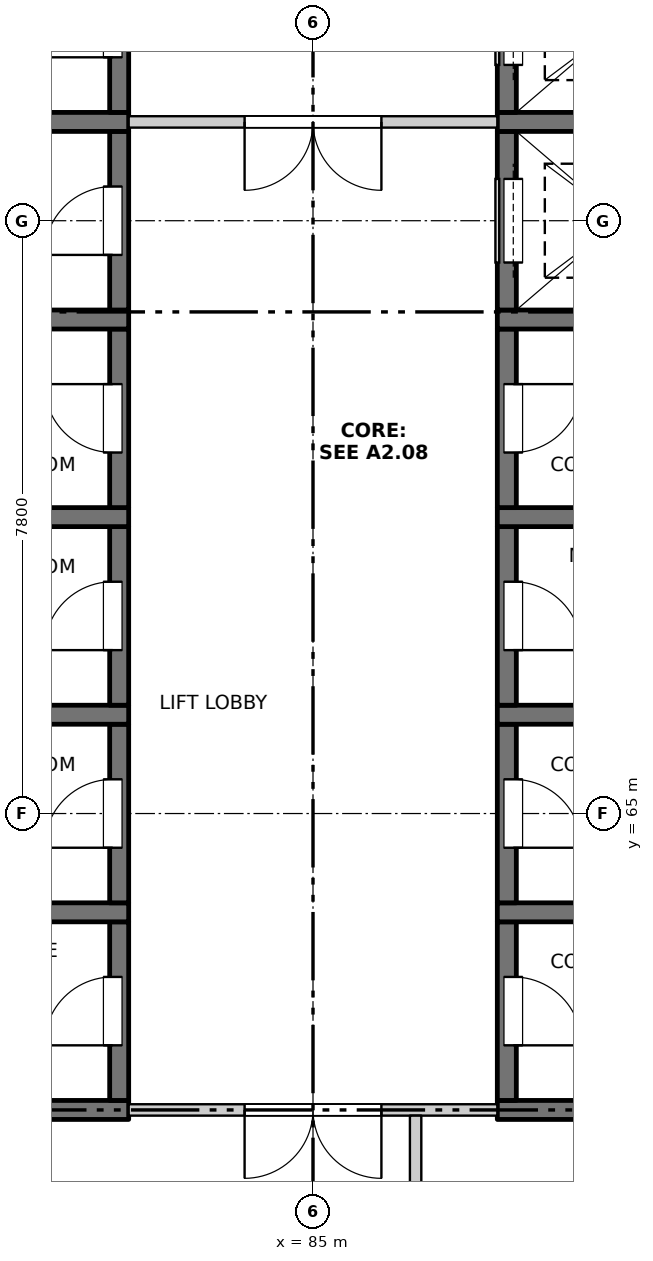
"""IFC4 building model, lengths in metres.
Left out: names, types, materials, properties, quantities, classifications, styles, units other than length and angle.
Written with IfcOpenShell. Run it as: python <this file> out.ifc"""

import sys

from ifc_helpers import new_model, si_unit, direction, frame, frame_2d, origin, place, context, subcontext, project, spatial, rectangle, extrude, element, fill, save


model = new_model("IFC4")
c1 = context("Model", 3, precision=1e-05, world=origin(), true_north=direction((0.0, 1.0)))
c2 = subcontext(c1, "Body", "Model", "MODEL_VIEW")
j1 = project(units=[si_unit("LENGTHUNIT", "METRE"), si_unit("PLANEANGLEUNIT", "RADIAN")], contexts=[c1])
p1 = place(None, origin())
s1 = spatial("IfcSite", under=j1, at=p1, CompositionType="ELEMENT")
p2 = place(p1, origin())
s2 = spatial("IfcBuilding", under=s1, at=p2, CompositionType="ELEMENT")
p3 = place(p2, frame((0.0, 0.0, 249.4)))
s3 = spatial("IfcBuildingStorey", under=s2, at=p3, CompositionType="ELEMENT", Elevation=249.4)
p4 = place(p3, frame((79.575, 61.1, -0.25), z_axis=(0.0, 0.0, 1.0), x_axis=(1.0, 0.0, 0.0)))
e1 = element("IfcWall", 1, at=p4, inside=s3, PredefinedType="SOLIDWALL", context=c2, shape_type="SweptSolid", body=[
    extrude(rectangle(XDim=3.0, YDim=0.25, at=frame_2d((1.5, 0.0))), origin(), (0.0, 0.0, 1.0), 3.4),
])
p5 = place(p3, frame((82.45, 61.225, -0.25), z_axis=(0.0, 0.0, 1.0), x_axis=(0.0, 1.0, 0.0)))
e2 = element("IfcWall", 2, at=p5, inside=s3, PredefinedType="SOLIDWALL", context=c2, shape_type="SweptSolid", body=[
    extrude(rectangle(XDim=2.35, YDim=0.25, at=frame_2d((1.175, 0.0))), origin(), (0.0, 0.0, 1.0), 3.4),
])
p6 = place(p5, frame((0.725, 0.0, 0.25)))
e3 = element("IfcOpeningElement", 3, at=p6, cuts=e2, PredefinedType="OPENING", context=c2, shape_type="SweptSolid", body=[
    extrude(rectangle(XDim=0.9, YDim=2.1, at=frame_2d((0.45, 1.05))), frame((0.0, 0.135, 0.0), z_axis=(0.0, -1.0, 0.0), x_axis=(1.0, 0.0, 0.0)), (0.0, 0.0, 1.0), 0.27),
])
p7 = place(p3, frame((79.575, 63.7, -0.25), z_axis=(0.0, 0.0, 1.0), x_axis=(1.0, 0.0, 0.0)))
e4 = element("IfcWall", 4, at=p7, inside=s3, PredefinedType="SOLIDWALL", context=c2, shape_type="SweptSolid", body=[
    extrude(rectangle(XDim=3.0, YDim=0.25, at=frame_2d((1.5, 0.0))), origin(), (0.0, 0.0, 1.0), 3.4),
])
p8 = place(p3, frame((82.45, 63.825, -0.25), z_axis=(0.0, 0.0, 1.0), x_axis=(0.0, 1.0, 0.0)))
e5 = element("IfcWall", 5, at=p8, inside=s3, PredefinedType="SOLIDWALL", context=c2, shape_type="SweptSolid", body=[
    extrude(rectangle(XDim=2.35, YDim=0.25, at=frame_2d((1.175, 0.0))), origin(), (0.0, 0.0, 1.0), 3.4),
])
p9 = place(p8, frame((0.725, 0.0, 0.25)))
e6 = element("IfcOpeningElement", 6, at=p9, cuts=e5, PredefinedType="OPENING", context=c2, shape_type="SweptSolid", body=[
    extrude(rectangle(XDim=0.9, YDim=2.1, at=frame_2d((0.45, 1.05))), frame((0.0, 0.135, 0.0), z_axis=(0.0, -1.0, 0.0), x_axis=(1.0, 0.0, 0.0)), (0.0, 0.0, 1.0), 0.27),
])
p10 = place(p3, frame((79.575, 66.3, -0.25), z_axis=(0.0, 0.0, 1.0), x_axis=(1.0, 0.0, 0.0)))
e7 = element("IfcWall", 7, at=p10, inside=s3, PredefinedType="SOLIDWALL", context=c2, shape_type="SweptSolid", body=[
    extrude(rectangle(XDim=3.0, YDim=0.25, at=frame_2d((1.5, 0.0))), origin(), (0.0, 0.0, 1.0), 3.4),
])
p11 = place(p3, frame((82.45, 66.425, -0.25), z_axis=(0.0, 0.0, 1.0), x_axis=(0.0, 1.0, 0.0)))
e8 = element("IfcWall", 8, at=p11, inside=s3, PredefinedType="SOLIDWALL", context=c2, shape_type="SweptSolid", body=[
    extrude(rectangle(XDim=2.35, YDim=0.25, at=frame_2d((1.175, 0.0))), origin(), (0.0, 0.0, 1.0), 3.4),
])
p12 = place(p11, frame((0.725, 0.0, 0.25)))
e9 = element("IfcOpeningElement", 9, at=p12, cuts=e8, PredefinedType="OPENING", context=c2, shape_type="SweptSolid", body=[
    extrude(rectangle(XDim=0.9, YDim=2.1, at=frame_2d((0.45, 1.05))), frame((0.0, 0.135, 0.0), z_axis=(0.0, -1.0, 0.0), x_axis=(1.0, 0.0, 0.0)), (0.0, 0.0, 1.0), 0.27),
])
p13 = place(p3, frame((79.575, 68.9, -0.25), z_axis=(0.0, 0.0, 1.0), x_axis=(1.0, 0.0, 0.0)))
e10 = element("IfcWall", 10, at=p13, inside=s3, PredefinedType="SOLIDWALL", context=c2, shape_type="SweptSolid", body=[
    extrude(rectangle(XDim=3.0, YDim=0.25, at=frame_2d((1.5, 0.0))), origin(), (0.0, 0.0, 1.0), 3.4),
])
p14 = place(p3, frame((82.45, 69.025, -0.25), z_axis=(0.0, 0.0, 1.0), x_axis=(0.0, 1.0, 0.0)))
e11 = element("IfcWall", 11, at=p14, inside=s3, PredefinedType="SOLIDWALL", context=c2, shape_type="SweptSolid", body=[
    extrude(rectangle(XDim=2.35, YDim=0.25, at=frame_2d((1.175, 0.0))), origin(), (0.0, 0.0, 1.0), 3.4),
])
p15 = place(p14, frame((0.725, 0.0, 0.25)))
e12 = element("IfcOpeningElement", 12, at=p15, cuts=e11, PredefinedType="OPENING", context=c2, shape_type="SweptSolid", body=[
    extrude(rectangle(XDim=0.9, YDim=2.1, at=frame_2d((0.45, 1.05))), frame((0.0, 0.135, 0.0), z_axis=(0.0, -1.0, 0.0), x_axis=(1.0, 0.0, 0.0)), (0.0, 0.0, 1.0), 0.27),
])
p16 = place(p3, frame((79.575, 71.5, -0.25), z_axis=(0.0, 0.0, 1.0), x_axis=(1.0, 0.0, 0.0)))
e13 = element("IfcWall", 13, at=p16, inside=s3, PredefinedType="SOLIDWALL", context=c2, shape_type="SweptSolid", body=[
    extrude(rectangle(XDim=3.0, YDim=0.25, at=frame_2d((1.5, 0.0))), origin(), (0.0, 0.0, 1.0), 3.4),
])
p17 = place(p3, frame((82.45, 71.625, -0.25), z_axis=(0.0, 0.0, 1.0), x_axis=(0.0, 1.0, 0.0)))
e14 = element("IfcWall", 14, at=p17, inside=s3, PredefinedType="SOLIDWALL", context=c2, shape_type="SweptSolid", body=[
    extrude(rectangle(XDim=2.35, YDim=0.25, at=frame_2d((1.175, 0.0))), origin(), (0.0, 0.0, 1.0), 3.4),
])
p18 = place(p17, frame((0.725, 0.0, 0.25)))
e15 = element("IfcOpeningElement", 15, at=p18, cuts=e14, PredefinedType="OPENING", context=c2, shape_type="SweptSolid", body=[
    extrude(rectangle(XDim=0.9, YDim=2.1, at=frame_2d((0.45, 1.05))), frame((0.0, 0.135, 0.0), z_axis=(0.0, -1.0, 0.0), x_axis=(1.0, 0.0, 0.0)), (0.0, 0.0, 1.0), 0.27),
])
p19 = place(p3, frame((79.575, 74.1, -0.25), z_axis=(0.0, 0.0, 1.0), x_axis=(1.0, 0.0, 0.0)))
e16 = element("IfcWall", 16, at=p19, inside=s3, PredefinedType="SOLIDWALL", context=c2, shape_type="SweptSolid", body=[
    extrude(rectangle(XDim=3.0, YDim=0.25, at=frame_2d((1.5, 0.0))), origin(), (0.0, 0.0, 1.0), 3.4),
])
p20 = place(p3, frame((82.45, 74.225, -0.25), z_axis=(0.0, 0.0, 1.0), x_axis=(0.0, 1.0, 0.0)))
e17 = element("IfcWall", 17, at=p20, inside=s3, PredefinedType="SOLIDWALL", context=c2, shape_type="SweptSolid", body=[
    extrude(rectangle(XDim=2.35, YDim=0.25, at=frame_2d((1.175, 0.0))), origin(), (0.0, 0.0, 1.0), 3.4),
])
p21 = place(p20, frame((0.725, 0.0, 0.25)))
e18 = element("IfcOpeningElement", 18, at=p21, cuts=e17, PredefinedType="OPENING", context=c2, shape_type="SweptSolid", body=[
    extrude(rectangle(XDim=0.9, YDim=2.1, at=frame_2d((0.45, 1.05))), frame((0.0, 0.135, 0.0), z_axis=(0.0, -1.0, 0.0), x_axis=(1.0, 0.0, 0.0)), (0.0, 0.0, 1.0), 0.27),
])
p22 = place(p3, frame((87.425, 61.1, -0.25), z_axis=(0.0, 0.0, 1.0), x_axis=(1.0, 0.0, 0.0)))
e19 = element("IfcWall", 19, at=p22, inside=s3, PredefinedType="SOLIDWALL", context=c2, shape_type="SweptSolid", body=[
    extrude(rectangle(XDim=3.0, YDim=0.25, at=frame_2d((1.5, 0.0))), origin(), (0.0, 0.0, 1.0), 3.4),
])
p23 = place(p3, frame((87.55, 61.225, -0.25), z_axis=(0.0, 0.0, 1.0), x_axis=(0.0, 1.0, 0.0)))
e20 = element("IfcWall", 20, at=p23, inside=s3, PredefinedType="SOLIDWALL", context=c2, shape_type="SweptSolid", body=[
    extrude(rectangle(XDim=2.35, YDim=0.25, at=frame_2d((1.175, 0.0))), origin(), (0.0, 0.0, 1.0), 3.4),
])
p24 = place(p23, frame((0.725, 0.0, 0.25)))
e21 = element("IfcOpeningElement", 21, at=p24, cuts=e20, PredefinedType="OPENING", context=c2, shape_type="SweptSolid", body=[
    extrude(rectangle(XDim=0.9, YDim=2.1, at=frame_2d((0.45, 1.05))), frame((0.0, 0.135, 0.0), z_axis=(0.0, -1.0, 0.0), x_axis=(1.0, 0.0, 0.0)), (0.0, 0.0, 1.0), 0.27),
])
p25 = place(p3, frame((87.425, 63.7, -0.25), z_axis=(0.0, 0.0, 1.0), x_axis=(1.0, 0.0, 0.0)))
e22 = element("IfcWall", 22, at=p25, inside=s3, PredefinedType="SOLIDWALL", context=c2, shape_type="SweptSolid", body=[
    extrude(rectangle(XDim=3.0, YDim=0.25, at=frame_2d((1.5, 0.0))), origin(), (0.0, 0.0, 1.0), 3.4),
])
p26 = place(p3, frame((87.55, 63.825, -0.25), z_axis=(0.0, 0.0, 1.0), x_axis=(0.0, 1.0, 0.0)))
e23 = element("IfcWall", 23, at=p26, inside=s3, PredefinedType="SOLIDWALL", context=c2, shape_type="SweptSolid", body=[
    extrude(rectangle(XDim=2.35, YDim=0.25, at=frame_2d((1.175, 0.0))), origin(), (0.0, 0.0, 1.0), 3.4),
])
p27 = place(p26, frame((0.725, 0.0, 0.25)))
e24 = element("IfcOpeningElement", 24, at=p27, cuts=e23, PredefinedType="OPENING", context=c2, shape_type="SweptSolid", body=[
    extrude(rectangle(XDim=0.9, YDim=2.1, at=frame_2d((0.45, 1.05))), frame((0.0, 0.135, 0.0), z_axis=(0.0, -1.0, 0.0), x_axis=(1.0, 0.0, 0.0)), (0.0, 0.0, 1.0), 0.27),
])
p28 = place(p3, frame((87.425, 66.3, -0.25), z_axis=(0.0, 0.0, 1.0), x_axis=(1.0, 0.0, 0.0)))
e25 = element("IfcWall", 25, at=p28, inside=s3, PredefinedType="SOLIDWALL", context=c2, shape_type="SweptSolid", body=[
    extrude(rectangle(XDim=3.0, YDim=0.25, at=frame_2d((1.5, 0.0))), origin(), (0.0, 0.0, 1.0), 3.4),
])
p29 = place(p3, frame((87.55, 66.425, -0.25), z_axis=(0.0, 0.0, 1.0), x_axis=(0.0, 1.0, 0.0)))
e26 = element("IfcWall", 26, at=p29, inside=s3, PredefinedType="SOLIDWALL", context=c2, shape_type="SweptSolid", body=[
    extrude(rectangle(XDim=2.35, YDim=0.25, at=frame_2d((1.175, 0.0))), origin(), (0.0, 0.0, 1.0), 3.4),
])
p30 = place(p29, frame((0.725, 0.0, 0.25)))
e27 = element("IfcOpeningElement", 27, at=p30, cuts=e26, PredefinedType="OPENING", context=c2, shape_type="SweptSolid", body=[
    extrude(rectangle(XDim=0.9, YDim=2.1, at=frame_2d((0.45, 1.05))), frame((0.0, 0.135, 0.0), z_axis=(0.0, -1.0, 0.0), x_axis=(1.0, 0.0, 0.0)), (0.0, 0.0, 1.0), 0.27),
])
p31 = place(p3, frame((87.425, 68.9, -0.25), z_axis=(0.0, 0.0, 1.0), x_axis=(1.0, 0.0, 0.0)))
e28 = element("IfcWall", 28, at=p31, inside=s3, PredefinedType="SOLIDWALL", context=c2, shape_type="SweptSolid", body=[
    extrude(rectangle(XDim=3.0, YDim=0.25, at=frame_2d((1.5, 0.0))), origin(), (0.0, 0.0, 1.0), 3.4),
])
p32 = place(p3, frame((87.55, 69.025, -0.25), z_axis=(0.0, 0.0, 1.0), x_axis=(0.0, 1.0, 0.0)))
e29 = element("IfcWall", 29, at=p32, inside=s3, PredefinedType="SOLIDWALL", context=c2, shape_type="SweptSolid", body=[
    extrude(rectangle(XDim=2.35, YDim=0.25, at=frame_2d((1.175, 0.0))), origin(), (0.0, 0.0, 1.0), 3.4),
])
p33 = place(p32, frame((0.725, 0.0, 0.25)))
e30 = element("IfcOpeningElement", 30, at=p33, cuts=e29, PredefinedType="OPENING", context=c2, shape_type="SweptSolid", body=[
    extrude(rectangle(XDim=0.9, YDim=2.1, at=frame_2d((0.45, 1.05))), frame((0.0, 0.135, 0.0), z_axis=(0.0, -1.0, 0.0), x_axis=(1.0, 0.0, 0.0)), (0.0, 0.0, 1.0), 0.27),
])
p34 = place(p3, frame((87.425, 71.5, -0.25), z_axis=(0.0, 0.0, 1.0), x_axis=(1.0, 0.0, 0.0)))
e31 = element("IfcWall", 31, at=p34, inside=s3, PredefinedType="SOLIDWALL", context=c2, shape_type="SweptSolid", body=[
    extrude(rectangle(XDim=3.0, YDim=0.25, at=frame_2d((1.5, 0.0))), origin(), (0.0, 0.0, 1.0), 3.4),
])
p35 = place(p3, frame((87.55, 71.625, -0.25), z_axis=(0.0, 0.0, 1.0), x_axis=(0.0, 1.0, 0.0)))
e32 = element("IfcWall", 32, at=p35, inside=s3, PredefinedType="SOLIDWALL", context=c2, shape_type="SweptSolid", body=[
    extrude(rectangle(XDim=2.35, YDim=0.25, at=frame_2d((1.175, 0.0))), origin(), (0.0, 0.0, 1.0), 3.4),
])
p36 = place(p35, frame((0.625, 0.0, 0.25)))
e33 = element("IfcOpeningElement", 33, at=p36, cuts=e32, PredefinedType="OPENING", context=c2, shape_type="SweptSolid", body=[
    extrude(rectangle(XDim=1.1, YDim=2.1, at=frame_2d((0.55, 1.05))), frame((0.0, 0.135, 0.0), z_axis=(0.0, -1.0, 0.0), x_axis=(1.0, 0.0, 0.0)), (0.0, 0.0, 1.0), 0.27),
])
p37 = place(p3, frame((87.425, 74.1, -0.25), z_axis=(0.0, 0.0, 1.0), x_axis=(1.0, 0.0, 0.0)))
e34 = element("IfcWall", 34, at=p37, inside=s3, PredefinedType="SOLIDWALL", context=c2, shape_type="SweptSolid", body=[
    extrude(rectangle(XDim=3.0, YDim=0.25, at=frame_2d((1.5, 0.0))), origin(), (0.0, 0.0, 1.0), 3.4),
])
p38 = place(p3, frame((87.55, 74.225, -0.25), z_axis=(0.0, 0.0, 1.0), x_axis=(0.0, 1.0, 0.0)))
e35 = element("IfcWall", 35, at=p38, inside=s3, PredefinedType="SOLIDWALL", context=c2, shape_type="SweptSolid", body=[
    extrude(rectangle(XDim=2.35, YDim=0.25, at=frame_2d((1.175, 0.0))), origin(), (0.0, 0.0, 1.0), 3.4),
])
p39 = place(p38, frame((0.625, 0.0, 0.25)))
e36 = element("IfcOpeningElement", 36, at=p39, cuts=e35, PredefinedType="OPENING", context=c2, shape_type="SweptSolid", body=[
    extrude(rectangle(XDim=1.1, YDim=2.1, at=frame_2d((0.55, 1.05))), frame((0.0, 0.135, 0.0), z_axis=(0.0, -1.0, 0.0), x_axis=(1.0, 0.0, 0.0)), (0.0, 0.0, 1.0), 0.27),
])
p40 = place(p3, frame((82.575, 61.1, 0.0), z_axis=(0.0, 0.0, 1.0), x_axis=(1.0, 0.0, 0.0)))
e37 = element("IfcWall", 37, at=p40, inside=s3, PredefinedType="PARTITIONING", context=c2, shape_type="SweptSolid", body=[
    extrude(rectangle(XDim=4.85, YDim=0.15, at=frame_2d((2.425, 0.0))), origin(), (0.0, 0.0, 1.0), 3.15),
])
p41 = place(p40, frame((1.525, 0.0, 0.0)))
e38 = element("IfcOpeningElement", 38, at=p41, cuts=e37, PredefinedType="OPENING", context=c2, shape_type="SweptSolid", body=[
    extrude(rectangle(XDim=1.8, YDim=2.1, at=frame_2d((0.9, 1.05))), frame((0.0, 0.085, 0.0), z_axis=(0.0, -1.0, 0.0), x_axis=(1.0, 0.0, 0.0)), (0.0, 0.0, 1.0), 0.17),
])
p42 = place(p3, frame((82.575, 74.1, 0.0), z_axis=(0.0, 0.0, 1.0), x_axis=(1.0, 0.0, 0.0)))
e39 = element("IfcWall", 39, at=p42, inside=s3, PredefinedType="PARTITIONING", context=c2, shape_type="SweptSolid", body=[
    extrude(rectangle(XDim=4.85, YDim=0.15, at=frame_2d((2.425, 0.0))), origin(), (0.0, 0.0, 1.0), 3.15),
])
p43 = place(p42, frame((1.525, 0.0, 0.0)))
e40 = element("IfcOpeningElement", 40, at=p43, cuts=e39, PredefinedType="OPENING", context=c2, shape_type="SweptSolid", body=[
    extrude(rectangle(XDim=1.8, YDim=2.1, at=frame_2d((0.9, 1.05))), frame((0.0, 0.085, 0.0), z_axis=(0.0, -1.0, 0.0), x_axis=(1.0, 0.0, 0.0)), (0.0, 0.0, 1.0), 0.17),
])
p44 = place(p3, frame((86.35, 55.45, 0.0), z_axis=(0.0, 0.0, 1.0), x_axis=(0.0, 1.0, 0.0)))
e41 = element("IfcWall", 41, at=p44, inside=s3, PredefinedType="PARTITIONING", context=c2, shape_type="SweptSolid", body=[
    extrude(rectangle(XDim=5.575, YDim=0.15, at=frame_2d((2.788, 0.0))), origin(), (0.0, 0.0, 1.0), 3.15),
])
p45 = place(p44, frame((2.25, 0.0, 0.0)))
e42 = element("IfcOpeningElement", 42, at=p45, cuts=e41, PredefinedType="OPENING", context=c2, shape_type="SweptSolid", body=[
    extrude(rectangle(XDim=0.9, YDim=2.1, at=frame_2d((0.45, 1.05))), frame((0.0, 0.085, 0.0), z_axis=(0.0, -1.0, 0.0), x_axis=(1.0, 0.0, 0.0)), (0.0, 0.0, 1.0), 0.17),
])
p46 = place(p41, origin())
e43 = element("IfcDoor", 43, at=p46, inside=s3, OperationType="DOUBLE_DOOR_SINGLE_SWING", PredefinedType="DOOR", context=c2, shape_type="SweptSolid", body=[
    extrude(rectangle(XDim=1.8, YDim=2.1, at=frame_2d((0.9, 1.05))), frame((0.0, 0.025, 0.0), z_axis=(0.0, -1.0, 0.0), x_axis=(1.0, 0.0, 0.0)), (0.0, 0.0, 1.0), 0.05),
])
fill(e38, e43)
p47 = place(p6, origin())
e44 = element("IfcDoor", 44, at=p47, inside=s3, OperationType="SINGLE_SWING_LEFT", PredefinedType="DOOR", context=c2, shape_type="SweptSolid", body=[
    extrude(rectangle(XDim=0.9, YDim=2.1, at=frame_2d((0.45, 1.05))), frame((0.0, 0.11, 0.0), z_axis=(0.0, -1.0, 0.0), x_axis=(1.0, 0.0, 0.0)), (0.0, 0.0, 1.0), 0.05),
])
fill(e3, e44)
p48 = place(p24, origin())
e45 = element("IfcDoor", 45, at=p48, inside=s3, OperationType="SINGLE_SWING_RIGHT", PredefinedType="DOOR", context=c2, shape_type="SweptSolid", body=[
    extrude(rectangle(XDim=0.9, YDim=2.1, at=frame_2d((0.45, 1.05))), frame((0.0, -0.06, 0.0), z_axis=(0.0, -1.0, 0.0), x_axis=(1.0, 0.0, 0.0)), (0.0, 0.0, 1.0), 0.05),
])
fill(e21, e45)
p49 = place(p9, origin())
e46 = element("IfcDoor", 46, at=p49, inside=s3, OperationType="SINGLE_SWING_LEFT", PredefinedType="DOOR", context=c2, shape_type="SweptSolid", body=[
    extrude(rectangle(XDim=0.9, YDim=2.1, at=frame_2d((0.45, 1.05))), frame((0.0, 0.11, 0.0), z_axis=(0.0, -1.0, 0.0), x_axis=(1.0, 0.0, 0.0)), (0.0, 0.0, 1.0), 0.05),
])
fill(e6, e46)
p50 = place(p27, origin())
e47 = element("IfcDoor", 47, at=p50, inside=s3, OperationType="SINGLE_SWING_RIGHT", PredefinedType="DOOR", context=c2, shape_type="SweptSolid", body=[
    extrude(rectangle(XDim=0.9, YDim=2.1, at=frame_2d((0.45, 1.05))), frame((0.0, -0.06, 0.0), z_axis=(0.0, -1.0, 0.0), x_axis=(1.0, 0.0, 0.0)), (0.0, 0.0, 1.0), 0.05),
])
fill(e24, e47)
p51 = place(p12, origin())
e48 = element("IfcDoor", 48, at=p51, inside=s3, OperationType="SINGLE_SWING_LEFT", PredefinedType="DOOR", context=c2, shape_type="SweptSolid", body=[
    extrude(rectangle(XDim=0.9, YDim=2.1, at=frame_2d((0.45, 1.05))), frame((0.0, 0.11, 0.0), z_axis=(0.0, -1.0, 0.0), x_axis=(1.0, 0.0, 0.0)), (0.0, 0.0, 1.0), 0.05),
])
fill(e9, e48)
p52 = place(p30, origin())
e49 = element("IfcDoor", 49, at=p52, inside=s3, OperationType="SINGLE_SWING_RIGHT", PredefinedType="DOOR", context=c2, shape_type="SweptSolid", body=[
    extrude(rectangle(XDim=0.9, YDim=2.1, at=frame_2d((0.45, 1.05))), frame((0.0, -0.06, 0.0), z_axis=(0.0, -1.0, 0.0), x_axis=(1.0, 0.0, 0.0)), (0.0, 0.0, 1.0), 0.05),
])
fill(e27, e49)
p53 = place(p15, origin())
e50 = element("IfcDoor", 50, at=p53, inside=s3, OperationType="SINGLE_SWING_RIGHT", PredefinedType="DOOR", context=c2, shape_type="SweptSolid", body=[
    extrude(rectangle(XDim=0.9, YDim=2.1, at=frame_2d((0.45, 1.05))), frame((0.0, 0.11, 0.0), z_axis=(0.0, -1.0, 0.0), x_axis=(1.0, 0.0, 0.0)), (0.0, 0.0, 1.0), 0.05),
])
fill(e12, e50)
p54 = place(p33, origin())
e51 = element("IfcDoor", 51, at=p54, inside=s3, OperationType="SINGLE_SWING_LEFT", PredefinedType="DOOR", context=c2, shape_type="SweptSolid", body=[
    extrude(rectangle(XDim=0.9, YDim=2.1, at=frame_2d((0.45, 1.05))), frame((0.0, -0.06, 0.0), z_axis=(0.0, -1.0, 0.0), x_axis=(1.0, 0.0, 0.0)), (0.0, 0.0, 1.0), 0.05),
])
fill(e30, e51)
p55 = place(p18, origin())
e52 = element("IfcDoor", 52, at=p55, inside=s3, OperationType="SINGLE_SWING_LEFT", PredefinedType="DOOR", context=c2, shape_type="SweptSolid", body=[
    extrude(rectangle(XDim=0.9, YDim=2.1, at=frame_2d((0.45, 1.05))), frame((0.0, 0.11, 0.0), z_axis=(0.0, -1.0, 0.0), x_axis=(1.0, 0.0, 0.0)), (0.0, 0.0, 1.0), 0.05),
])
fill(e15, e52)
p56 = place(p36, origin())
e53 = element("IfcDoor", 53, at=p56, inside=s3, OperationType="SLIDING_TO_LEFT", PredefinedType="DOOR", context=c2, shape_type="SweptSolid", body=[
    extrude(rectangle(XDim=1.1, YDim=2.1, at=frame_2d((0.55, 1.05))), frame((0.0, -0.06, 0.0), z_axis=(0.0, -1.0, 0.0), x_axis=(1.0, 0.0, 0.0)), (0.0, 0.0, 1.0), 0.05),
])
fill(e33, e53)
p57 = place(p43, origin())
e54 = element("IfcDoor", 54, at=p57, inside=s3, OperationType="DOUBLE_DOOR_SINGLE_SWING", PredefinedType="DOOR", context=c2, shape_type="SweptSolid", body=[
    extrude(rectangle(XDim=1.8, YDim=2.1, at=frame_2d((0.9, 1.05))), frame((0.0, 0.025, 0.0), z_axis=(0.0, -1.0, 0.0), x_axis=(1.0, 0.0, 0.0)), (0.0, 0.0, 1.0), 0.05),
])
fill(e40, e54)
p58 = place(p21, origin())
e55 = element("IfcDoor", 55, at=p58, inside=s3, OperationType="SINGLE_SWING_LEFT", PredefinedType="DOOR", context=c2, shape_type="SweptSolid", body=[
    extrude(rectangle(XDim=0.9, YDim=2.1, at=frame_2d((0.45, 1.05))), frame((0.0, 0.11, 0.0), z_axis=(0.0, -1.0, 0.0), x_axis=(1.0, 0.0, 0.0)), (0.0, 0.0, 1.0), 0.05),
])
fill(e18, e55)
p59 = place(p39, origin())
e56 = element("IfcDoor", 56, at=p59, inside=s3, OperationType="SLIDING_TO_LEFT", PredefinedType="DOOR", context=c2, shape_type="SweptSolid", body=[
    extrude(rectangle(XDim=1.1, YDim=2.1, at=frame_2d((0.55, 1.05))), frame((0.0, -0.06, 0.0), z_axis=(0.0, -1.0, 0.0), x_axis=(1.0, 0.0, 0.0)), (0.0, 0.0, 1.0), 0.05),
])
fill(e36, e56)
save(model, sys.argv[1])
